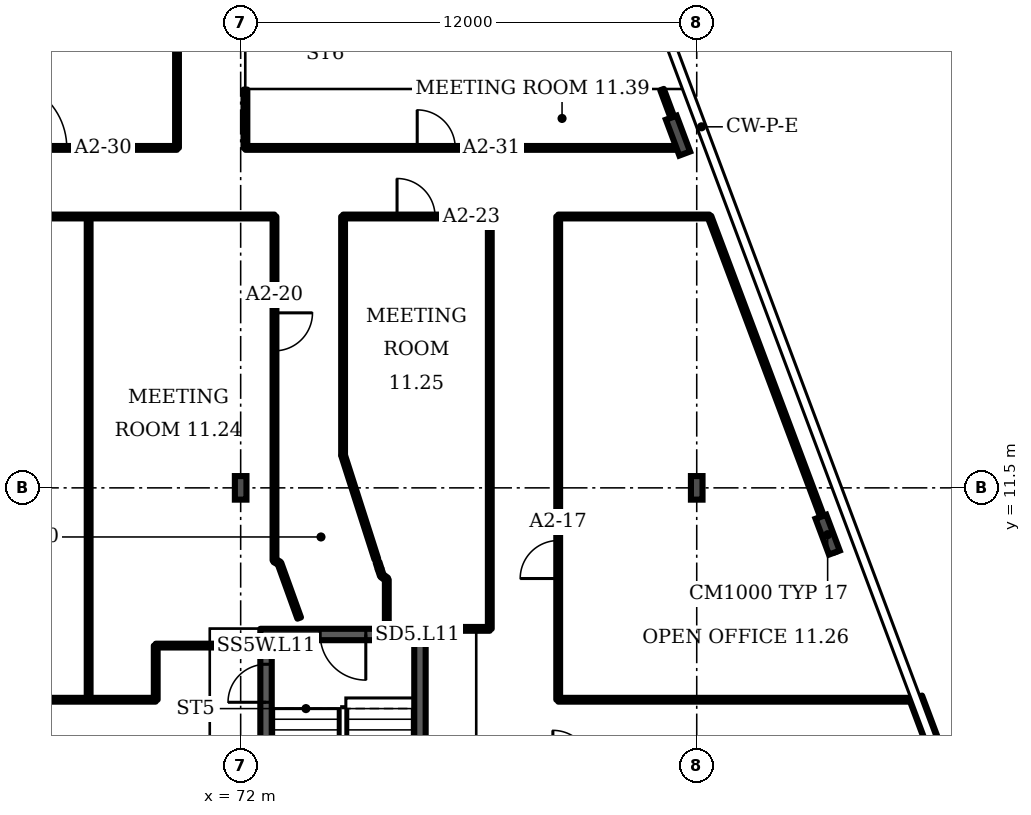
"""IFC4 building model, lengths in metres.
Left out: names, types, materials, properties, quantities, classifications, styles, units other than length and angle.
Written with IfcOpenShell. Run it as: python <this file> out.ifc"""

import sys

from ifc_helpers import new_model, si_unit, direction, frame, frame_2d, origin, origin_2d, place, context, subcontext, project, spatial, rectangle, i_section, extrude, element, fill, save


model = new_model("IFC4")
c1 = context("Model", 3, precision=1e-05, world=origin(), true_north=direction((0.0, 1.0)))
c2 = subcontext(c1, "Body", "Model", "MODEL_VIEW")
j1 = project(units=[si_unit("LENGTHUNIT", "METRE"), si_unit("PLANEANGLEUNIT", "RADIAN")], contexts=[c1])
p1 = place(None, origin())
s1 = spatial("IfcSite", under=j1, at=p1, CompositionType="ELEMENT")
p2 = place(p1, origin())
s2 = spatial("IfcBuilding", under=s1, at=p2, CompositionType="ELEMENT")
p3 = place(p2, frame((0.0, 0.0, 59.5)))
s3 = spatial("IfcBuildingStorey", under=s2, at=p3, CompositionType="ELEMENT", Elevation=59.5)
for number, where, z_axis, x_axis in (
    (1, (87.445, 10.268, 0.0), (0.0, 0.0, 1.0), (0.936, 0.351, 0.0)),
    (2, (83.507, 20.768, 0.0), (0.0, 0.0, 1.0), (0.936, 0.351, 0.0)),
):
    element("IfcColumn", number, at=place(p3, frame(where, z_axis=z_axis, x_axis=x_axis)), inside=s3, PredefinedType="COLUMN", context=c2, shape_type="SweptSolid", body=[
        extrude(i_section(OverallWidth=0.302, OverallDepth=1.008, WebThickness=0.021, FlangeThickness=0.04, FilletRadius=0.03, at=origin_2d()), origin(), (0.0, 0.0, 1.0), 3.6),
    ])
for number, where, z_axis, x_axis in (
    (3, (72.0, 11.5, 0.0), (0.0, 0.0, 1.0), (1.0, 0.0, 0.0)),
    (4, (84.0, 11.5, 0.0), (0.0, 0.0, 1.0), (1.0, 0.0, 0.0)),
):
    element("IfcColumn", number, at=place(p3, frame(where, z_axis=z_axis, x_axis=x_axis)), inside=s3, PredefinedType="COLUMN", context=c2, shape_type="SweptSolid", body=[
        extrude(i_section(OverallWidth=0.305, OverallDepth=0.62, WebThickness=0.021, FlangeThickness=0.04, FilletRadius=0.027, at=origin_2d()), origin(), (0.0, 0.0, 1.0), 3.6),
    ])
p4 = place(p3, frame((91.926, 0.211, 0.0), z_axis=(0.0, 0.0, 1.0), x_axis=(-0.351118, 0.936328, 0.0)))
e5 = element("IfcWall", 5, at=p4, inside=s3, PredefinedType="SOLIDWALL", context=c2, shape_type="SweptSolid", body=[
    extrude(rectangle(XDim=6.154, YDim=0.35, at=frame_2d((3.077, 0.0))), origin(), (0.0, 0.0, 1.0), 1.0),
])
p5 = place(p3, frame((72.518, 7.642, 0.0), z_axis=(0.0, 0.0, 1.0), x_axis=(1.0, 0.0, 0.0)))
e6 = element("IfcWall", 6, at=p5, inside=s3, PredefinedType="SHEAR", context=c2, shape_type="SweptSolid", body=[
    extrude(rectangle(XDim=4.35, YDim=0.3, at=frame_2d((2.175, 0.0))), origin(), (0.0, 0.0, 1.0), 3.2),
])
p6 = place(p5, frame((1.575, 0.0, 0.0)))
e7 = element("IfcOpeningElement", 7, at=p6, cuts=e6, PredefinedType="OPENING", context=c2, shape_type="SweptSolid", body=[
    extrude(rectangle(XDim=1.2, YDim=2.1, at=frame_2d((0.6, 1.05))), frame((0.0, 0.16, 0.0), z_axis=(0.0, -1.0, 0.0), x_axis=(1.0, 0.0, 0.0)), (0.0, 0.0, 1.0), 0.32),
])
p7 = place(p3, frame((72.667, 0.292, 0.0), z_axis=(0.0, 0.0, 1.0), x_axis=(0.0, 1.0, 0.0)))
e8 = element("IfcWall", 8, at=p7, inside=s3, PredefinedType="SHEAR", context=c2, shape_type="SweptSolid", body=[
    extrude(rectangle(XDim=7.2, YDim=0.3, at=frame_2d((3.6, 0.0))), origin(), (0.0, 0.0, 1.0), 3.2),
])
p8 = place(p7, frame((5.566, 0.0, 0.0)))
e9 = element("IfcOpeningElement", 9, at=p8, cuts=e8, PredefinedType="OPENING", context=c2, shape_type="SweptSolid", body=[
    extrude(rectangle(XDim=1.0, YDim=2.1, at=frame_2d((0.5, 1.05))), frame((0.0, 0.16, 0.0), z_axis=(0.0, -1.0, 0.0), x_axis=(1.0, 0.0, 0.0)), (0.0, 0.0, 1.0), 0.32),
])
p9 = place(p3, frame((11.505, 20.445, 0.0), z_axis=(0.0, 0.0, 1.0), x_axis=(1.0, 0.0, 0.0)))
e10 = element("IfcWall", 10, at=p9, inside=s3, PredefinedType="PARTITIONING", context=c2, shape_type="SweptSolid", body=[
    extrude(rectangle(XDim=58.82, YDim=0.1, at=frame_2d((29.41, 0.0))), origin(), (0.0, 0.0, 1.0), 3.2),
])
p10 = place(p9, frame((0.21, 0.0, 0.0)))
e11 = element("IfcOpeningElement", 11, at=p10, cuts=e10, PredefinedType="OPENING", context=c2, shape_type="SweptSolid", body=[
    extrude(rectangle(XDim=1.0, YDim=2.1, at=frame_2d((0.5, 1.05))), frame((0.0, 0.06, 0.0), z_axis=(0.0, -1.0, 0.0), x_axis=(1.0, 0.0, 0.0)), (0.0, 0.0, 1.0), 0.12),
])
p11 = place(p9, frame((8.33, 0.0, 0.0)))
e12 = element("IfcOpeningElement", 12, at=p11, cuts=e10, PredefinedType="OPENING", context=c2, shape_type="SweptSolid", body=[
    extrude(rectangle(XDim=1.0, YDim=2.1, at=frame_2d((0.5, 1.05))), frame((0.0, 0.06, 0.0), z_axis=(0.0, -1.0, 0.0), x_axis=(1.0, 0.0, 0.0)), (0.0, 0.0, 1.0), 0.12),
])
p12 = place(p9, frame((22.795, 0.0, 0.0)))
e13 = element("IfcOpeningElement", 13, at=p12, cuts=e10, PredefinedType="OPENING", context=c2, shape_type="SweptSolid", body=[
    extrude(rectangle(XDim=1.0, YDim=2.1, at=frame_2d((0.5, 1.05))), frame((0.0, 0.06, 0.0), z_axis=(0.0, -1.0, 0.0), x_axis=(1.0, 0.0, 0.0)), (0.0, 0.0, 1.0), 0.12),
])
p13 = place(p9, frame((26.995, 0.0, 0.0)))
e14 = element("IfcOpeningElement", 14, at=p13, cuts=e10, PredefinedType="OPENING", context=c2, shape_type="SweptSolid", body=[
    extrude(rectangle(XDim=1.0, YDim=2.1, at=frame_2d((0.5, 1.05))), frame((0.0, 0.06, 0.0), z_axis=(0.0, -1.0, 0.0), x_axis=(1.0, 0.0, 0.0)), (0.0, 0.0, 1.0), 0.12),
])
p14 = place(p9, frame((30.995, 0.0, 0.0)))
e15 = element("IfcOpeningElement", 15, at=p14, cuts=e10, PredefinedType="OPENING", context=c2, shape_type="SweptSolid", body=[
    extrude(rectangle(XDim=1.0, YDim=2.1, at=frame_2d((0.5, 1.05))), frame((0.0, 0.06, 0.0), z_axis=(0.0, -1.0, 0.0), x_axis=(1.0, 0.0, 0.0)), (0.0, 0.0, 1.0), 0.12),
])
p15 = place(p9, frame((38.575, 0.0, 0.0)))
e16 = element("IfcOpeningElement", 16, at=p15, cuts=e10, PredefinedType="OPENING", context=c2, shape_type="SweptSolid", body=[
    extrude(rectangle(XDim=1.0, YDim=2.1, at=frame_2d((0.5, 1.05))), frame((0.0, 0.06, 0.0), z_axis=(0.0, -1.0, 0.0), x_axis=(1.0, 0.0, 0.0)), (0.0, 0.0, 1.0), 0.12),
])
p16 = place(p9, frame((54.12, 0.0, 0.0)))
e17 = element("IfcOpeningElement", 17, at=p16, cuts=e10, PredefinedType="OPENING", context=c2, shape_type="SweptSolid", body=[
    extrude(rectangle(XDim=1.8, YDim=2.1, at=frame_2d((0.9, 1.05))), frame((0.0, 0.06, 0.0), z_axis=(0.0, -1.0, 0.0), x_axis=(1.0, 0.0, 0.0)), (0.0, 0.0, 1.0), 0.12),
])
p17 = place(p3, frame((39.55, 18.64, 0.0), z_axis=(0.0, 0.0, 1.0), x_axis=(1.0, 0.0, 0.0)))
e18 = element("IfcWall", 18, at=p17, inside=s3, PredefinedType="PARTITIONING", context=c2, shape_type="SweptSolid", body=[
    extrude(rectangle(XDim=33.34, YDim=0.1, at=frame_2d((16.67, 0.0))), origin(), (0.0, 0.0, 1.0), 3.2),
])
p18 = place(p17, frame((4.645, 0.0, 0.0)))
e19 = element("IfcOpeningElement", 19, at=p18, cuts=e18, PredefinedType="OPENING", context=c2, shape_type="SweptSolid", body=[
    extrude(rectangle(XDim=1.0, YDim=2.1, at=frame_2d((0.5, 1.05))), frame((0.0, 0.06, 0.0), z_axis=(0.0, -1.0, 0.0), x_axis=(1.0, 0.0, 0.0)), (0.0, 0.0, 1.0), 0.12),
])
p19 = place(p3, frame((40.535, 5.925, 0.0), z_axis=(0.0, 0.0, 1.0), x_axis=(1.0, 0.0, 0.0)))
e20 = element("IfcWall", 20, at=p19, inside=s3, PredefinedType="PARTITIONING", context=c2, shape_type="SweptSolid", body=[
    extrude(rectangle(XDim=29.23, YDim=0.1, at=frame_2d((14.615, 0.0))), origin(), (0.0, 0.0, 1.0), 3.2),
])
p20 = place(p19, frame((8.86, 0.0, 0.0)))
e21 = element("IfcOpeningElement", 21, at=p20, cuts=e20, PredefinedType="OPENING", context=c2, shape_type="SweptSolid", body=[
    extrude(rectangle(XDim=1.0, YDim=2.1, at=frame_2d((0.5, 1.05))), frame((0.0, 0.06, 0.0), z_axis=(0.0, -1.0, 0.0), x_axis=(1.0, 0.0, 0.0)), (0.0, 0.0, 1.0), 0.12),
])
p21 = place(p19, frame((18.765, 0.0, 0.0)))
e22 = element("IfcOpeningElement", 22, at=p21, cuts=e20, PredefinedType="OPENING", context=c2, shape_type="SweptSolid", body=[
    extrude(rectangle(XDim=1.8, YDim=2.1, at=frame_2d((0.9, 1.05))), frame((0.0, 0.06, 0.0), z_axis=(0.0, -1.0, 0.0), x_axis=(1.0, 0.0, 0.0)), (0.0, 0.0, 1.0), 0.12),
])
p22 = place(p3, frame((68.0, 5.925, 0.0), z_axis=(0.0, 0.0, 1.0), x_axis=(0.0, 1.0, 0.0)))
e23 = element("IfcWall", 23, at=p22, inside=s3, PredefinedType="PARTITIONING", context=c2, shape_type="SweptSolid", body=[
    extrude(rectangle(XDim=12.715, YDim=0.1, at=frame_2d((6.357, 0.0))), origin(), (0.0, 0.0, 1.0), 3.2),
])
p23 = place(p3, frame((69.765, 5.925, 0.0), z_axis=(0.0, 0.0, 1.0), x_axis=(0.0, 1.0, 0.0)))
e24 = element("IfcWall", 24, at=p23, inside=s3, PredefinedType="PARTITIONING", context=c2, shape_type="SweptSolid", body=[
    extrude(rectangle(XDim=1.425, YDim=0.1, at=frame_2d((0.712, 0.0))), origin(), (0.0, 0.0, 1.0), 3.2),
])
p24 = place(p3, frame((69.765, 7.35, 0.0), z_axis=(0.0, 0.0, 1.0), x_axis=(1.0, 0.0, 0.0)))
e25 = element("IfcWall", 25, at=p24, inside=s3, PredefinedType="PARTITIONING", context=c2, shape_type="SweptSolid", body=[
    extrude(rectangle(XDim=2.753, YDim=0.1, at=frame_2d((1.376, 0.0))), origin(), (0.0, 0.0, 1.0), 3.2),
])
p25 = place(p3, frame((70.325, 20.445, 0.0), z_axis=(0.0, 0.0, 1.0), x_axis=(0.0, 1.0, 0.0)))
e26 = element("IfcWall", 26, at=p25, inside=s3, PredefinedType="PARTITIONING", context=c2, shape_type="SweptSolid", body=[
    extrude(rectangle(XDim=6.205, YDim=0.1, at=frame_2d((3.103, 0.0))), origin(), (0.0, 0.0, 1.0), 3.2),
])
p26 = place(p3, frame((72.125, 20.445, 0.0), z_axis=(0.0, 0.0, 1.0), x_axis=(0.0, 1.0, 0.0)))
e27 = element("IfcWall", 27, at=p26, inside=s3, PredefinedType="PARTITIONING", context=c2, shape_type="SweptSolid", body=[
    extrude(rectangle(XDim=1.535, YDim=0.1, at=frame_2d((0.768, 0.0))), origin(), (0.0, 0.0, 1.0), 3.2),
])
p27 = place(p3, frame((72.125, 20.445, 0.0), z_axis=(0.0, 0.0, 1.0), x_axis=(1.0, 0.0, 0.0)))
e28 = element("IfcWall", 28, at=p27, inside=s3, PredefinedType="PARTITIONING", context=c2, shape_type="SweptSolid", body=[
    extrude(rectangle(XDim=11.535, YDim=0.1, at=frame_2d((5.768, 0.0))), origin(), (0.0, 0.0, 1.0), 3.2),
])
p28 = place(p27, frame((4.521, 0.0, 0.0)))
e29 = element("IfcOpeningElement", 29, at=p28, cuts=e28, PredefinedType="OPENING", context=c2, shape_type="SweptSolid", body=[
    extrude(rectangle(XDim=1.0, YDim=2.1, at=frame_2d((0.5, 1.05))), frame((0.0, 0.06, 0.0), z_axis=(0.0, -1.0, 0.0), x_axis=(1.0, 0.0, 0.0)), (0.0, 0.0, 1.0), 0.12),
])
p29 = place(p3, frame((72.89, 9.59, 0.0), z_axis=(0.0, 0.0, 1.0), x_axis=(0.0, 1.0, 0.0)))
e30 = element("IfcWall", 30, at=p29, inside=s3, PredefinedType="PARTITIONING", context=c2, shape_type="SweptSolid", body=[
    extrude(rectangle(XDim=9.05, YDim=0.1, at=frame_2d((4.525, 0.0))), origin(), (0.0, 0.0, 1.0), 3.2),
])
p30 = place(p29, frame((5.515, 0.0, 0.0)))
e31 = element("IfcOpeningElement", 31, at=p30, cuts=e30, PredefinedType="OPENING", context=c2, shape_type="SweptSolid", body=[
    extrude(rectangle(XDim=1.0, YDim=2.1, at=frame_2d((0.5, 1.05))), frame((0.0, 0.06, 0.0), z_axis=(0.0, -1.0, 0.0), x_axis=(1.0, 0.0, 0.0)), (0.0, 0.0, 1.0), 0.12),
])
p31 = place(p3, frame((73.02, 9.515, 0.0), z_axis=(0.0, 0.0, 1.0), x_axis=(-0.865836, 0.500333, 0.0)))
e32 = element("IfcWall", 32, at=p31, inside=s3, PredefinedType="PARTITIONING", context=c2, shape_type="SweptSolid", body=[
    extrude(rectangle(XDim=0.15, YDim=0.1, at=frame_2d((0.075, 0.0))), origin(), (0.0, 0.0, 1.0), 3.2),
])
p32 = place(p3, frame((73.54, 8.075, 0.0), z_axis=(0.0, 0.0, 1.0), x_axis=(-0.339669, 0.940548, 0.0)))
e33 = element("IfcWall", 33, at=p32, inside=s3, PredefinedType="PARTITIONING", context=c2, shape_type="SweptSolid", body=[
    extrude(rectangle(XDim=1.531, YDim=0.1, at=frame_2d((0.766, 0.0))), origin(), (0.0, 0.0, 1.0), 3.2),
])
p33 = place(p3, frame((74.695, 12.36, 0.0), z_axis=(0.0, 0.0, 1.0), x_axis=(0.0, 1.0, 0.0)))
e34 = element("IfcWall", 34, at=p33, inside=s3, PredefinedType="PARTITIONING", context=c2, shape_type="SweptSolid", body=[
    extrude(rectangle(XDim=6.28, YDim=0.1, at=frame_2d((3.14, 0.0))), origin(), (0.0, 0.0, 1.0), 3.2),
])
p34 = place(p3, frame((74.695, 18.64, 0.0), z_axis=(0.0, 0.0, 1.0), x_axis=(1.0, 0.0, 0.0)))
e35 = element("IfcWall", 35, at=p34, inside=s3, PredefinedType="PARTITIONING", context=c2, shape_type="SweptSolid", body=[
    extrude(rectangle(XDim=3.86, YDim=0.1, at=frame_2d((1.93, 0.0))), origin(), (0.0, 0.0, 1.0), 3.2),
])
p35 = place(p34, frame((1.42, 0.0, 0.0)))
e36 = element("IfcOpeningElement", 36, at=p35, cuts=e35, PredefinedType="OPENING", context=c2, shape_type="SweptSolid", body=[
    extrude(rectangle(XDim=1.0, YDim=2.1, at=frame_2d((0.5, 1.05))), frame((0.0, 0.06, 0.0), z_axis=(0.0, -1.0, 0.0), x_axis=(1.0, 0.0, 0.0)), (0.0, 0.0, 1.0), 0.12),
])
p36 = place(p3, frame((75.57, 9.625, 0.0), z_axis=(0.0, 0.0, 1.0), x_axis=(-0.305088, 0.952327, 0.0)))
e37 = element("IfcWall", 37, at=p36, inside=s3, PredefinedType="PARTITIONING", context=c2, shape_type="SweptSolid", body=[
    extrude(rectangle(XDim=2.872, YDim=0.1, at=frame_2d((1.436, 0.0))), origin(), (0.0, 0.0, 1.0), 3.2),
])
p37 = place(p3, frame((75.655, 9.37, 0.0), z_axis=(0.0, 0.0, 1.0), x_axis=(-0.299793, 0.954008, 0.0)))
e38 = element("IfcWall", 38, at=p37, inside=s3, PredefinedType="PARTITIONING", context=c2, shape_type="SweptSolid", body=[
    extrude(rectangle(XDim=0.183, YDim=0.1, at=frame_2d((0.092, 0.0))), origin(), (0.0, 0.0, 1.0), 3.2),
])
p38 = place(p3, frame((75.715, 9.19, 0.0), z_axis=(0.0, 0.0, 1.0), x_axis=(-0.316228, 0.948684, 0.0)))
e39 = element("IfcWall", 39, at=p38, inside=s3, PredefinedType="PARTITIONING", context=c2, shape_type="SweptSolid", body=[
    extrude(rectangle(XDim=0.19, YDim=0.1, at=frame_2d((0.095, 0.0))), origin(), (0.0, 0.0, 1.0), 3.2),
])
p39 = place(p3, frame((75.845, 7.812, 0.0), z_axis=(0.0, 0.0, 1.0), x_axis=(0.0, 1.0, 0.0)))
e40 = element("IfcWall", 40, at=p39, inside=s3, PredefinedType="PARTITIONING", context=c2, shape_type="SweptSolid", body=[
    extrude(rectangle(XDim=1.278, YDim=0.1, at=frame_2d((0.639, 0.0))), origin(), (0.0, 0.0, 1.0), 3.2),
])
p40 = place(p3, frame((75.845, 9.095, 0.0), z_axis=(0.0, 0.0, 1.0), x_axis=(-0.807226, 0.590246, 0.0)))
e41 = element("IfcWall", 41, at=p40, inside=s3, PredefinedType="PARTITIONING", context=c2, shape_type="SweptSolid", body=[
    extrude(rectangle(XDim=0.161, YDim=0.1, at=frame_2d((0.081, 0.0))), origin(), (0.0, 0.0, 1.0), 3.2),
])
p41 = place(p3, frame((76.867, 7.79, 0.0), z_axis=(0.0, 0.0, 1.0), x_axis=(1.0, 0.0, 0.0)))
e42 = element("IfcWall", 42, at=p41, inside=s3, PredefinedType="PARTITIONING", context=c2, shape_type="SweptSolid", body=[
    extrude(rectangle(XDim=1.688, YDim=0.1, at=frame_2d((0.844, 0.0))), origin(), (0.0, 0.0, 1.0), 3.2),
])
p42 = place(p3, frame((78.555, 7.79, 0.0), z_axis=(0.0, 0.0, 1.0), x_axis=(0.0, 1.0, 0.0)))
e43 = element("IfcWall", 43, at=p42, inside=s3, PredefinedType="PARTITIONING", context=c2, shape_type="SweptSolid", body=[
    extrude(rectangle(XDim=10.85, YDim=0.1, at=frame_2d((5.425, 0.0))), origin(), (0.0, 0.0, 1.0), 3.2),
])
p43 = place(p3, frame((80.355, 5.925, 0.0), z_axis=(0.0, 0.0, 1.0), x_axis=(0.0, 1.0, 0.0)))
e44 = element("IfcWall", 44, at=p43, inside=s3, PredefinedType="PARTITIONING", context=c2, shape_type="SweptSolid", body=[
    extrude(rectangle(XDim=12.715, YDim=0.1, at=frame_2d((6.357, 0.0))), origin(), (0.0, 0.0, 1.0), 3.2),
])
p44 = place(p43, frame((3.19, 0.0, 0.0)))
e45 = element("IfcOpeningElement", 45, at=p44, cuts=e44, PredefinedType="OPENING", context=c2, shape_type="SweptSolid", body=[
    extrude(rectangle(XDim=1.0, YDim=2.1, at=frame_2d((0.5, 1.05))), frame((0.0, 0.06, 0.0), z_axis=(0.0, -1.0, 0.0), x_axis=(1.0, 0.0, 0.0)), (0.0, 0.0, 1.0), 0.12),
])
p45 = place(p3, frame((80.355, 5.925, 0.0), z_axis=(0.0, 0.0, 1.0), x_axis=(1.0, 0.0, 0.0)))
e46 = element("IfcWall", 46, at=p45, inside=s3, PredefinedType="PARTITIONING", context=c2, shape_type="SweptSolid", body=[
    extrude(rectangle(XDim=9.402, YDim=0.1, at=frame_2d((4.701, 0.0))), origin(), (0.0, 0.0, 1.0), 2.58),
])
p46 = place(p3, frame((80.355, 18.64, 0.0), z_axis=(0.0, 0.0, 1.0), x_axis=(1.0, 0.0, 0.0)))
e47 = element("IfcWall", 47, at=p46, inside=s3, PredefinedType="PARTITIONING", context=c2, shape_type="SweptSolid", body=[
    extrude(rectangle(XDim=3.98, YDim=0.1, at=frame_2d((1.99, 0.0))), origin(), (0.0, 0.0, 1.0), 3.2),
])
p47 = place(p3, frame((83.66, 20.445, 0.0), z_axis=(0.0, 0.0, 1.0), x_axis=(-0.349474, 0.936948, 0.0)))
e48 = element("IfcWall", 48, at=p47, inside=s3, PredefinedType="PARTITIONING", context=c2, shape_type="SweptSolid", body=[
    extrude(rectangle(XDim=1.638, YDim=0.1, at=frame_2d((0.819, 0.0))), origin(), (0.0, 0.0, 1.0), 2.58),
])
p48 = place(p3, frame((87.65, 9.81, 0.0), z_axis=(0.0, 0.0, 1.0), x_axis=(-0.351473, 0.9362, 0.0)))
e49 = element("IfcWall", 49, at=p48, inside=s3, PredefinedType="PARTITIONING", context=c2, shape_type="SweptSolid", body=[
    extrude(rectangle(XDim=9.432, YDim=0.1, at=frame_2d((4.716, 0.0))), origin(), (0.0, 0.0, 1.0), 2.58),
])
p49 = place(p3, frame((72.817, 7.354, 0.0), z_axis=(0.0, 0.0, 1.0), x_axis=(0.999994, 0.002027, 0.0)))
e50 = element("IfcWall", 50, at=p49, inside=s3, PredefinedType="PARTITIONING", context=c2, shape_type="SweptSolid", body=[
    extrude(rectangle(XDim=0.723, YDim=0.1, at=frame_2d((0.361, 0.0))), origin(), (0.0, 0.0, 1.0), 3.2),
])
p50 = place(p3, frame((76.718, -0.008, 0.0), z_axis=(0.0, 0.0, 1.0), x_axis=(0.0, 1.0, 0.0)))
e51 = element("IfcWall", 51, at=p50, inside=s3, PredefinedType="SHEAR", context=c2, shape_type="SweptSolid", body=[
    extrude(rectangle(XDim=7.5, YDim=0.3, at=frame_2d((3.75, 0.0))), origin(), (0.0, 0.0, 1.0), 3.2),
])
p51 = place(p8, origin())
e52 = element("IfcDoor", 52, at=p51, inside=s3, OperationType="SINGLE_SWING_LEFT", PredefinedType="DOOR", context=c2, shape_type="SweptSolid", body=[
    extrude(rectangle(XDim=1.0, YDim=2.1, at=frame_2d((0.5, 1.05))), frame((0.0, 0.025, 0.0), z_axis=(0.0, -1.0, 0.0), x_axis=(1.0, 0.0, 0.0)), (0.0, 0.0, 1.0), 0.05),
])
fill(e9, e52)
p52 = place(p6, origin())
e53 = element("IfcDoor", 53, at=p52, inside=s3, OperationType="SINGLE_SWING_RIGHT", PredefinedType="DOOR", context=c2, shape_type="SweptSolid", body=[
    extrude(rectangle(XDim=1.2, YDim=2.1, at=frame_2d((0.6, 1.05))), frame((0.0, 0.025, 0.0), z_axis=(0.0, -1.0, 0.0), x_axis=(1.0, 0.0, 0.0)), (0.0, 0.0, 1.0), 0.05),
])
fill(e7, e53)
p53 = place(p44, origin())
e54 = element("IfcDoor", 54, at=p53, inside=s3, OperationType="SINGLE_SWING_LEFT", PredefinedType="DOOR", context=c2, shape_type="SweptSolid", body=[
    extrude(rectangle(XDim=1.0, YDim=2.1, at=frame_2d((0.5, 1.05))), frame((0.0, 0.025, 0.0), z_axis=(0.0, -1.0, 0.0), x_axis=(1.0, 0.0, 0.0)), (0.0, 0.0, 1.0), 0.05),
])
fill(e45, e54)
p54 = place(p30, origin())
e55 = element("IfcDoor", 55, at=p54, inside=s3, OperationType="SINGLE_SWING_RIGHT", PredefinedType="DOOR", context=c2, shape_type="SweptSolid", body=[
    extrude(rectangle(XDim=1.0, YDim=2.1, at=frame_2d((0.5, 1.05))), frame((0.0, 0.025, 0.0), z_axis=(0.0, -1.0, 0.0), x_axis=(1.0, 0.0, 0.0)), (0.0, 0.0, 1.0), 0.05),
])
fill(e31, e55)
p55 = place(p35, origin())
e56 = element("IfcDoor", 56, at=p55, inside=s3, OperationType="SINGLE_SWING_LEFT", PredefinedType="DOOR", context=c2, shape_type="SweptSolid", body=[
    extrude(rectangle(XDim=1.0, YDim=2.1, at=frame_2d((0.5, 1.05))), frame((0.0, 0.025, 0.0), z_axis=(0.0, -1.0, 0.0), x_axis=(1.0, 0.0, 0.0)), (0.0, 0.0, 1.0), 0.05),
])
fill(e36, e56)
p56 = place(p16, origin())
e57 = element("IfcDoor", 57, at=p56, inside=s3, OperationType="DOUBLE_DOOR_SINGLE_SWING", PredefinedType="DOOR", context=c2, shape_type="SweptSolid", body=[
    extrude(rectangle(XDim=1.8, YDim=2.1, at=frame_2d((0.9, 1.05))), frame((0.0, 0.025, 0.0), z_axis=(0.0, -1.0, 0.0), x_axis=(1.0, 0.0, 0.0)), (0.0, 0.0, 1.0), 0.05),
])
fill(e17, e57)
p57 = place(p28, origin())
e58 = element("IfcDoor", 58, at=p57, inside=s3, OperationType="SINGLE_SWING_LEFT", PredefinedType="DOOR", context=c2, shape_type="SweptSolid", body=[
    extrude(rectangle(XDim=1.0, YDim=2.1, at=frame_2d((0.5, 1.05))), frame((0.0, 0.025, 0.0), z_axis=(0.0, -1.0, 0.0), x_axis=(1.0, 0.0, 0.0)), (0.0, 0.0, 1.0), 0.05),
])
fill(e29, e58)
save(model, sys.argv[1])
